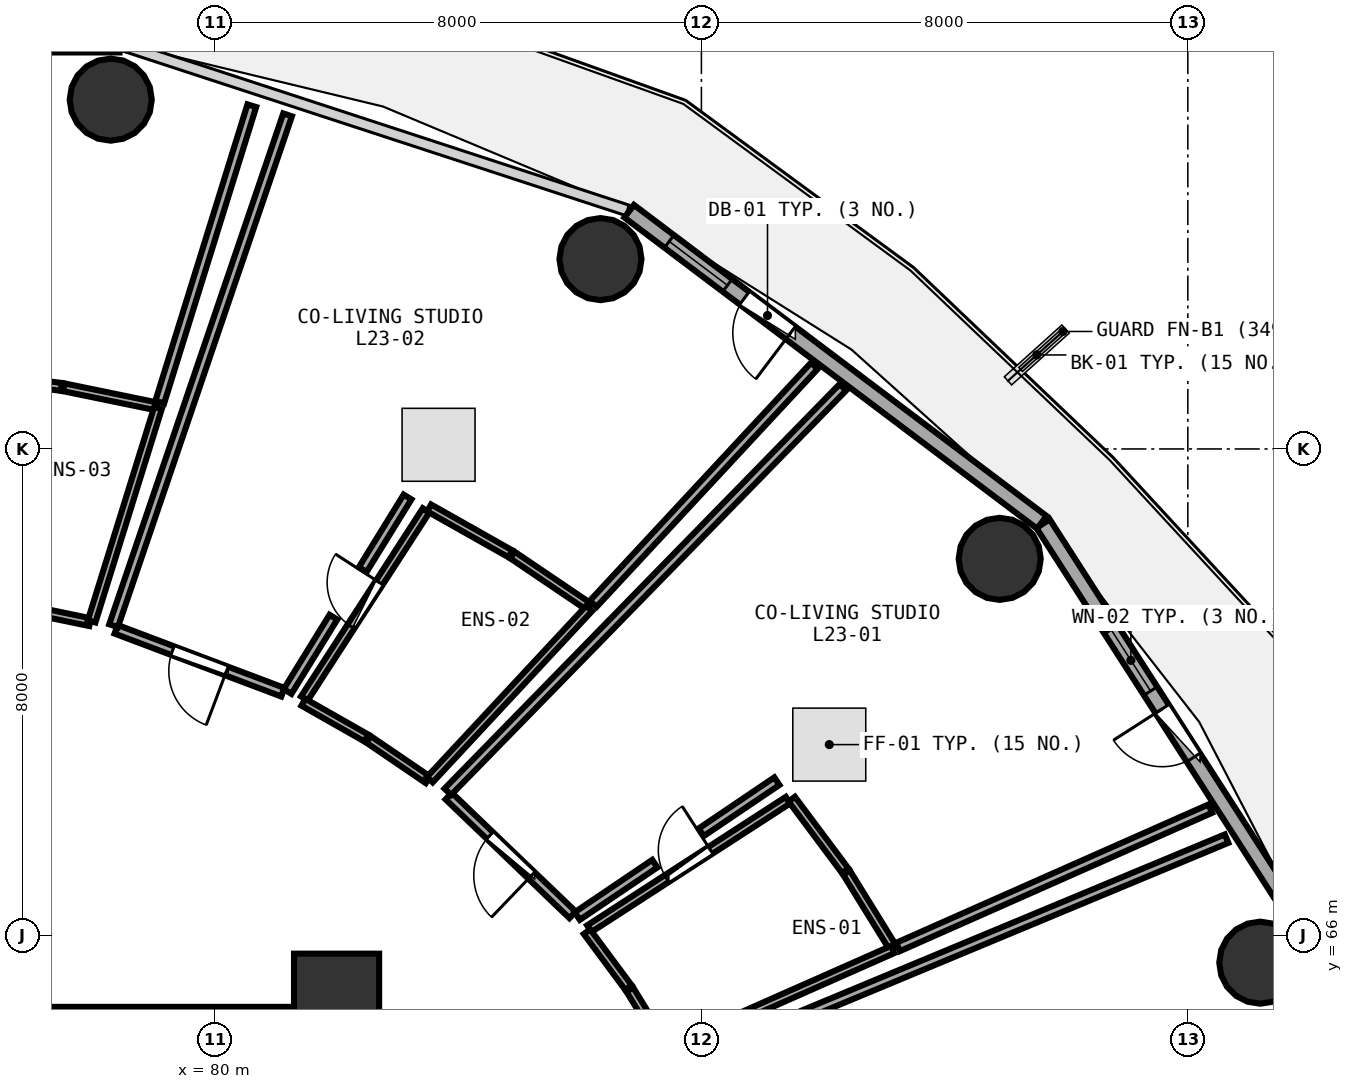
"""IFC4 building model, lengths in metres.
Left out: names, types, materials, properties, quantities, classifications, styles, units other than length and angle.
Written with IfcOpenShell. Run it as: python <this file> out.ifc"""

import sys

from ifc_helpers import new_model, si_unit, direction, frame, frame_2d, origin, origin_2d, place, context, subcontext, project, spatial, rectangle, circle, extrude, element, fill, save


model = new_model("IFC4")
c1 = context("Model", 3, precision=1e-05, world=origin(), true_north=direction((0.0, 1.0)))
c2 = subcontext(c1, "Body", "Model", "MODEL_VIEW")
j1 = project(units=[si_unit("LENGTHUNIT", "METRE"), si_unit("PLANEANGLEUNIT", "RADIAN")], contexts=[c1])
p1 = place(None, origin())
s1 = spatial("IfcSite", under=j1, at=p1, CompositionType="ELEMENT")
p2 = place(p1, origin())
s2 = spatial("IfcBuilding", under=s1, at=p2, CompositionType="ELEMENT")
p3 = place(p2, frame((0.0, 0.0, 91.35)))
s3 = spatial("IfcBuildingStorey", under=s2, at=p3, CompositionType="ELEMENT", Elevation=91.35)
p4 = place(p3, frame((82.0, 65.0, 0.0), z_axis=(0.0, 0.0, 1.0), x_axis=(1.0, 0.0, 0.0)))
e1 = element("IfcColumn", 1, at=p4, inside=s3, PredefinedType="PILASTER", context=c2, shape_type="SweptSolid", body=[
    extrude(rectangle(XDim=1.4, YDim=1.4, at=origin_2d()), origin(), (0.0, 0.0, 1.0), 3.75),
])
for number, where, z_axis, x_axis in (
    (2, (97.192, 65.552, 0.0), (0.0, 0.0, 1.0), (1.0, 0.0, 0.0)),
    (3, (92.906, 72.193, 0.0), (0.0, 0.0, 1.0), (1.0, 0.0, 0.0)),
    (4, (86.34, 77.122, 0.0), (0.0, 0.0, 1.0), (1.0, 0.0, 0.0)),
    (5, (78.286, 79.745, 0.0), (0.0, 0.0, 1.0), (1.0, 0.0, 0.0)),
):
    element("IfcColumn", number, at=place(p3, frame(where, z_axis=z_axis, x_axis=x_axis)), inside=s3, PredefinedType="COLUMN", context=c2, shape_type="SweptSolid", body=[
        extrude(circle(Radius=0.675, at=origin_2d()), origin(), (0.0, 0.0, 1.0), 3.75),
    ])
p5 = place(p3, frame((98.048, 65.879, 0.0), z_axis=(0.0, 0.0, 1.0), x_axis=(-0.540620528459, 0.841266571432, 0.0)))
e6 = element("IfcWall", 6, at=p5, inside=s3, PredefinedType="SOLIDWALL", context=c2, shape_type="SweptSolid", body=[
    extrude(rectangle(XDim=8.193, YDim=0.26, at=frame_2d((4.096, 0.0))), origin(), (0.0, 0.0, 1.0), 3.475),
])
p6 = place(p5, frame((3.621, 0.0, 0.0)))
e7 = element("IfcOpeningElement", 7, at=p6, cuts=e6, PredefinedType="OPENING", context=c2, shape_type="SweptSolid", body=[
    extrude(rectangle(XDim=0.95, YDim=2.1, at=frame_2d((0.475, 1.05))), frame((0.0, 0.14, 0.0), z_axis=(0.0, -1.0, 0.0), x_axis=(1.0, 0.0, 0.0)), (0.0, 0.0, 1.0), 0.28),
])
p7 = place(p5, frame((4.921, 0.0, 0.85)))
e8 = element("IfcOpeningElement", 8, at=p7, cuts=e6, PredefinedType="OPENING", context=c2, shape_type="SweptSolid", body=[
    extrude(rectangle(XDim=1.2, YDim=1.45, at=frame_2d((0.6, 0.725))), frame((0.0, 0.14, 0.0), z_axis=(0.0, -1.0, 0.0), x_axis=(1.0, 0.0, 0.0)), (0.0, 0.0, 1.0), 0.28),
])
p8 = place(p3, frame((93.599, 72.793, 0.0), z_axis=(0.0, 0.0, 1.0), x_axis=(-0.798501507879, 0.601992808857, 0.0)))
e9 = element("IfcWall", 9, at=p8, inside=s3, PredefinedType="SOLIDWALL", context=c2, shape_type="SweptSolid", body=[
    extrude(rectangle(XDim=8.499, YDim=0.26, at=frame_2d((4.25, 0.0))), origin(), (0.0, 0.0, 1.0), 3.475),
])
p9 = place(p8, frame((5.175, 0.0, 0.0)))
e10 = element("IfcOpeningElement", 10, at=p9, cuts=e9, PredefinedType="OPENING", context=c2, shape_type="SweptSolid", body=[
    extrude(rectangle(XDim=0.95, YDim=2.1, at=frame_2d((0.475, 1.05))), frame((0.0, 0.14, 0.0), z_axis=(0.0, -1.0, 0.0), x_axis=(1.0, 0.0, 0.0)), (0.0, 0.0, 1.0), 0.28),
])
p10 = place(p8, frame((6.475, 0.0, 0.85)))
e11 = element("IfcOpeningElement", 11, at=p10, cuts=e9, PredefinedType="OPENING", context=c2, shape_type="SweptSolid", body=[
    extrude(rectangle(XDim=1.2, YDim=1.45, at=frame_2d((0.6, 0.725))), frame((0.0, 0.14, 0.0), z_axis=(0.0, -1.0, 0.0), x_axis=(1.0, 0.0, 0.0)), (0.0, 0.0, 1.0), 0.28),
])
p11 = place(p3, frame((78.43, 80.651, 0.0), z_axis=(0.0, 0.0, 1.0), x_axis=(-1.0, 0.0, 0.0)))
e12 = element("IfcWall", 12, at=p11, inside=s3, PredefinedType="SOLIDWALL", context=c2, shape_type="SweptSolid", body=[
    extrude(rectangle(XDim=8.861, YDim=0.26, at=frame_2d((4.43, 0.0))), origin(), (0.0, 0.0, 1.0), 3.475),
])
p12 = place(p11, frame((3.63, 0.0, 0.85)))
e13 = element("IfcOpeningElement", 13, at=p12, cuts=e12, PredefinedType="OPENING", context=c2, shape_type="SweptSolid", body=[
    extrude(rectangle(XDim=1.6, YDim=1.45, at=frame_2d((0.8, 0.725))), frame((0.0, 0.14, 0.0), z_axis=(0.0, -1.0, 0.0), x_axis=(1.0, 0.0, 0.0)), (0.0, 0.0, 1.0), 0.28),
])
p13 = place(p3, frame((74.0, 64.6, 0.0), z_axis=(0.0, 0.0, 1.0), x_axis=(1.0, 0.0, 0.0)))
e14 = element("IfcWall", 14, at=p13, inside=s3, PredefinedType="SHEAR", context=c2, shape_type="SweptSolid", body=[
    extrude(rectangle(XDim=8.0, YDim=0.45, at=frame_2d((4.0, 0.0))), origin(), (0.0, 0.0, 1.0), 3.49),
])
p14 = place(p3, frame((86.156, 66.111, 0.0), z_axis=(0.0, 0.0, 1.0), x_axis=(0.839597088747, 0.543209654339, 0.0)))
e15 = element("IfcWall", 15, at=p14, inside=s3, PredefinedType="PLUMBINGWALL", context=c2, shape_type="SweptSolid", body=[
    extrude(rectangle(XDim=3.891, YDim=0.13, at=frame_2d((1.946, 0.0))), origin(), (0.0, 0.0, 1.0), 3.175),
])
p15 = place(p14, frame((1.516, 0.0, 0.0)))
e16 = element("IfcOpeningElement", 16, at=p15, cuts=e15, PredefinedType="OPENING", context=c2, shape_type="SweptSolid", body=[
    extrude(rectangle(XDim=0.86, YDim=2.05, at=frame_2d((0.43, 1.025))), frame((0.0, 0.075, 0.0), z_axis=(0.0, -1.0, 0.0), x_axis=(1.0, 0.0, 0.0)), (0.0, 0.0, 1.0), 0.15),
])
p16 = place(p3, frame((85.882, 66.337, 0.0), z_axis=(0.0, 0.0, 1.0), x_axis=(-0.721698326825, 0.692207718144, 0.0)))
e17 = element("IfcWall", 17, at=p16, inside=s3, PredefinedType="PARTITIONING", context=c2, shape_type="SweptSolid", body=[
    extrude(rectangle(XDim=2.823, YDim=0.15, at=frame_2d((1.412, 0.0))), origin(), (0.0, 0.0, 1.0), 2.925),
])
p17 = place(p16, frame((0.936, 0.0, 0.0)))
e18 = element("IfcOpeningElement", 18, at=p17, cuts=e17, PredefinedType="OPENING", context=c2, shape_type="SweptSolid", body=[
    extrude(rectangle(XDim=0.95, YDim=2.08, at=frame_2d((0.475, 1.04))), frame((0.0, 0.085, 0.0), z_axis=(0.0, -1.0, 0.0), x_axis=(1.0, 0.0, 0.0)), (0.0, 0.0, 1.0), 0.17),
])
p18 = place(p3, frame((81.469, 69.896, 0.0), z_axis=(0.0, 0.0, 1.0), x_axis=(0.543429789712, 0.839454622748, 0.0)))
e19 = element("IfcWall", 19, at=p18, inside=s3, PredefinedType="PLUMBINGWALL", context=c2, shape_type="SweptSolid", body=[
    extrude(rectangle(XDim=3.686, YDim=0.13, at=frame_2d((1.843, 0.0))), origin(), (0.0, 0.0, 1.0), 3.175),
])
p19 = place(p18, frame((1.413, 0.0, 0.0)))
e20 = element("IfcOpeningElement", 20, at=p19, cuts=e19, PredefinedType="OPENING", context=c2, shape_type="SweptSolid", body=[
    extrude(rectangle(XDim=0.86, YDim=2.05, at=frame_2d((0.43, 1.025))), frame((0.0, 0.075, 0.0), z_axis=(0.0, -1.0, 0.0), x_axis=(1.0, 0.0, 0.0)), (0.0, 0.0, 1.0), 0.15),
])
p20 = place(p3, frame((81.117, 69.999, 0.0), z_axis=(0.0, 0.0, 1.0), x_axis=(-0.935632349103, 0.352976071868, 0.0)))
e21 = element("IfcWall", 21, at=p20, inside=s3, PredefinedType="PARTITIONING", context=c2, shape_type="SweptSolid", body=[
    extrude(rectangle(XDim=2.931, YDim=0.15, at=frame_2d((1.465, 0.0))), origin(), (0.0, 0.0, 1.0), 2.925),
])
p21 = place(p20, frame((0.99, 0.0, 0.0)))
e22 = element("IfcOpeningElement", 22, at=p21, cuts=e21, PredefinedType="OPENING", context=c2, shape_type="SweptSolid", body=[
    extrude(rectangle(XDim=0.95, YDim=2.08, at=frame_2d((0.475, 1.04))), frame((0.0, 0.085, 0.0), z_axis=(0.0, -1.0, 0.0), x_axis=(1.0, 0.0, 0.0)), (0.0, 0.0, 1.0), 0.17),
])
p22 = place(p3, frame((87.417, 64.141, 0.0), z_axis=(0.0, 0.0, 1.0), x_axis=(-0.52310141153, 0.852270446077, 0.0)))
e23 = element("IfcWall", 23, at=p22, inside=s3, PredefinedType="PLUMBINGWALL", context=c2, shape_type="SweptSolid", body=[
    extrude(rectangle(XDim=1.135, YDim=0.13, at=frame_2d((0.568, 0.0))), origin(), (0.0, 0.0, 1.0), 2.925),
])
p23 = place(p3, frame((86.8, 65.142, 0.0), z_axis=(0.0, 0.0, 1.0), x_axis=(-0.595625136946, 0.803262532574, 0.0)))
e24 = element("IfcWall", 24, at=p23, inside=s3, PredefinedType="PLUMBINGWALL", context=c2, shape_type="SweptSolid", body=[
    extrude(rectangle(XDim=1.145, YDim=0.13, at=frame_2d((0.573, 0.0))), origin(), (0.0, 0.0, 1.0), 2.925),
])
p24 = place(p3, frame((89.486, 68.241, 0.0), z_axis=(0.0, 0.0, 1.0), x_axis=(0.598215175904, -0.801335512328, 0.0)))
e25 = element("IfcWall", 25, at=p24, inside=s3, PredefinedType="PLUMBINGWALL", context=c2, shape_type="SweptSolid", body=[
    extrude(rectangle(XDim=1.468, YDim=0.13, at=frame_2d((0.734, 0.0))), origin(), (0.0, 0.0, 1.0), 3.48),
])
p25 = place(p3, frame((90.386, 67.032, 0.0), z_axis=(0.0, 0.0, 1.0), x_axis=(0.525910281035, -0.850540049793, 0.0)))
e26 = element("IfcWall", 26, at=p25, inside=s3, PredefinedType="PLUMBINGWALL", context=c2, shape_type="SweptSolid", body=[
    extrude(rectangle(XDim=1.457, YDim=0.13, at=frame_2d((0.729, 0.0))), origin(), (0.0, 0.0, 1.0), 3.48),
])
p26 = place(p3, frame((91.145, 65.768, 0.0), z_axis=(0.0, 0.0, 1.0), x_axis=(-0.914586427441, -0.404390487946, 0.0)))
e27 = element("IfcWall", 27, at=p26, inside=s3, PredefinedType="PLUMBINGWALL", context=c2, shape_type="SweptSolid", body=[
    extrude(rectangle(XDim=4.045, YDim=0.13, at=frame_2d((2.022, 0.0))), origin(), (0.0, 0.0, 1.0), 2.925),
])
p27 = place(p3, frame((83.829, 68.362, 0.0), z_axis=(0.0, 0.0, 1.0), x_axis=(0.698749209364, 0.715366718833, 0.0)))
e28 = element("IfcWall", 28, at=p27, inside=s3, PredefinedType="PARTITIONING", context=c2, shape_type="SweptSolid", body=[
    extrude(rectangle(XDim=9.3, YDim=0.15, at=frame_2d((4.65, 0.0))), origin(), (0.0, 0.0, 1.0), 2.975),
])
p28 = place(p3, frame((96.369, 68.085, 0.0), z_axis=(0.0, 0.0, 1.0), x_axis=(-0.914319955381, -0.404992616219, 0.0)))
e29 = element("IfcWall", 29, at=p28, inside=s3, PredefinedType="PARTITIONING", context=c2, shape_type="SweptSolid", body=[
    extrude(rectangle(XDim=5.616, YDim=0.15, at=frame_2d((2.808, 0.0))), origin(), (0.0, 0.0, 1.0), 2.975),
])
p29 = place(p3, frame((89.241, 68.537, 0.0), z_axis=(0.0, 0.0, 1.0), x_axis=(-0.828582854192, -0.559866460631, 0.0)))
e30 = element("IfcWall", 30, at=p29, inside=s3, PredefinedType="PARTITIONING", context=c2, shape_type="SweptSolid", body=[
    extrude(rectangle(XDim=1.502, YDim=0.15, at=frame_2d((0.751, 0.0))), origin(), (0.0, 0.0, 1.0), 3.175),
])
p30 = place(p3, frame((87.234, 67.181, 0.0), z_axis=(0.0, 0.0, 1.0), x_axis=(-0.828521381114, -0.559957427879, 0.0)))
e31 = element("IfcWall", 31, at=p30, inside=s3, PredefinedType="PARTITIONING", context=c2, shape_type="SweptSolid", body=[
    extrude(rectangle(XDim=1.54, YDim=0.15, at=frame_2d((0.77, 0.0))), origin(), (0.0, 0.0, 1.0), 3.235),
])
p31 = place(p3, frame((83.503, 68.558, 0.0), z_axis=(0.0, 0.0, 1.0), x_axis=(-0.826715543633, 0.56262012932, 0.0)))
e32 = element("IfcWall", 32, at=p31, inside=s3, PredefinedType="PLUMBINGWALL", context=c2, shape_type="SweptSolid", body=[
    extrude(rectangle(XDim=1.184, YDim=0.13, at=frame_2d((0.592, 0.0))), origin(), (0.0, 0.0, 1.0), 2.925),
])
p32 = place(p3, frame((82.49, 69.246, 0.0), z_axis=(0.0, 0.0, 1.0), x_axis=(-0.869224537935, 0.494417538778, 0.0)))
e33 = element("IfcWall", 33, at=p32, inside=s3, PredefinedType="PLUMBINGWALL", context=c2, shape_type="SweptSolid", body=[
    extrude(rectangle(XDim=1.192, YDim=0.13, at=frame_2d((0.596, 0.0))), origin(), (0.0, 0.0, 1.0), 3.48),
])
p33 = place(p3, frame((83.522, 73.03, 0.0), z_axis=(0.0, 0.0, 1.0), x_axis=(0.870915556508, -0.491432694713, 0.0)))
e34 = element("IfcWall", 34, at=p33, inside=s3, PredefinedType="PLUMBINGWALL", context=c2, shape_type="SweptSolid", body=[
    extrude(rectangle(XDim=1.533, YDim=0.13, at=frame_2d((0.767, 0.0))), origin(), (0.0, 0.0, 1.0), 2.925),
])
p34 = place(p3, frame((84.892, 72.256, 0.0), z_axis=(0.0, 0.0, 1.0), x_axis=(0.828476223524, -0.560024237917, 0.0)))
e35 = element("IfcWall", 35, at=p34, inside=s3, PredefinedType="PLUMBINGWALL", context=c2, shape_type="SweptSolid", body=[
    extrude(rectangle(XDim=1.521, YDim=0.13, at=frame_2d((0.76, 0.0))), origin(), (0.0, 0.0, 1.0), 3.175),
])
p35 = place(p3, frame((86.154, 71.378, 0.0), z_axis=(0.0, 0.0, 1.0), x_axis=(-0.681137169266, -0.732155828116, 0.0)))
e36 = element("IfcWall", 36, at=p35, inside=s3, PredefinedType="PLUMBINGWALL", context=c2, shape_type="SweptSolid", body=[
    extrude(rectangle(XDim=3.847, YDim=0.13, at=frame_2d((1.924, 0.0))), origin(), (0.0, 0.0, 1.0), 3.175),
])
p36 = place(p3, frame((78.332, 71.093, 0.0), z_axis=(0.0, 0.0, 1.0), x_axis=(0.322500856516, 0.946569172088, 0.0)))
e37 = element("IfcWall", 37, at=p36, inside=s3, PredefinedType="PARTITIONING", context=c2, shape_type="SweptSolid", body=[
    extrude(rectangle(XDim=8.875, YDim=0.15, at=frame_2d((4.438, 0.0))), origin(), (0.0, 0.0, 1.0), 2.925),
])
p37 = place(p3, frame((89.858, 75.367, 0.0), z_axis=(0.0, 0.0, 1.0), x_axis=(-0.680841843483, -0.732430463704, 0.0)))
e38 = element("IfcWall", 38, at=p37, inside=s3, PredefinedType="PARTITIONING", context=c2, shape_type="SweptSolid", body=[
    extrude(rectangle(XDim=5.343, YDim=0.15, at=frame_2d((2.671, 0.0))), origin(), (0.0, 0.0, 1.0), 2.975),
])
p38 = place(p3, frame((83.167, 73.21, 0.0), z_axis=(0.0, 0.0, 1.0), x_axis=(-0.525107327047, -0.8510360128, 0.0)))
e39 = element("IfcWall", 39, at=p38, inside=s3, PredefinedType="PARTITIONING", context=c2, shape_type="SweptSolid", body=[
    extrude(rectangle(XDim=1.402, YDim=0.15, at=frame_2d((0.701, 0.0))), origin(), (0.0, 0.0, 1.0), 3.175),
])
p39 = place(p3, frame((81.948, 71.233, 0.0), z_axis=(0.0, 0.0, 1.0), x_axis=(-0.52498935376, -0.851108793539, 0.0)))
e40 = element("IfcWall", 40, at=p39, inside=s3, PredefinedType="PARTITIONING", context=c2, shape_type="SweptSolid", body=[
    extrude(rectangle(XDim=1.435, YDim=0.15, at=frame_2d((0.718, 0.0))), origin(), (0.0, 0.0, 1.0), 3.235),
])
p40 = place(p3, frame((77.946, 71.151, 0.0), z_axis=(0.0, 0.0, 1.0), x_axis=(-0.979121805859, 0.203274418684, 0.0)))
e41 = element("IfcWall", 41, at=p40, inside=s3, PredefinedType="PLUMBINGWALL", context=c2, shape_type="SweptSolid", body=[
    extrude(rectangle(XDim=1.219, YDim=0.13, at=frame_2d((0.609, 0.0))), origin(), (0.0, 0.0, 1.0), 3.48),
])
p41 = place(p3, frame((75.913, 75.22, 0.0), z_axis=(0.0, 0.0, 1.0), x_axis=(0.991898711333, -0.127031281405, 0.0)))
e42 = element("IfcWall", 42, at=p41, inside=s3, PredefinedType="PLUMBINGWALL", context=c2, shape_type="SweptSolid", body=[
    extrude(rectangle(XDim=1.574, YDim=0.13, at=frame_2d((0.787, 0.0))), origin(), (0.0, 0.0, 1.0), 3.48),
])
p42 = place(p3, frame((77.514, 75.014, 0.0), z_axis=(0.0, 0.0, 1.0), x_axis=(0.979487788462, -0.201503529137, 0.0)))
e43 = element("IfcWall", 43, at=p42, inside=s3, PredefinedType="PLUMBINGWALL", context=c2, shape_type="SweptSolid", body=[
    extrude(rectangle(XDim=1.568, YDim=0.13, at=frame_2d((0.784, 0.0))), origin(), (0.0, 0.0, 1.0), 3.48),
])
p43 = place(p3, frame((79.063, 74.675, 0.0), z_axis=(0.0, 0.0, 1.0), x_axis=(-0.296927892497, -0.954899903999, 0.0)))
e44 = element("IfcWall", 44, at=p43, inside=s3, PredefinedType="PLUMBINGWALL", context=c2, shape_type="SweptSolid", body=[
    extrude(rectangle(XDim=3.675, YDim=0.13, at=frame_2d((1.837, 0.0))), origin(), (0.0, 0.0, 1.0), 3.175),
])
p44 = place(p3, frame((80.606, 79.645, 0.0), z_axis=(0.0, 0.0, 1.0), x_axis=(-0.2966895532, -0.954973983427, 0.0)))
e45 = element("IfcWall", 45, at=p44, inside=s3, PredefinedType="PARTITIONING", context=c2, shape_type="SweptSolid", body=[
    extrude(rectangle(XDim=5.104, YDim=0.15, at=frame_2d((2.552, 0.0))), origin(), (0.0, 0.0, 1.0), 2.925),
])
p45 = place(p3, frame((87.625, 63.84, 0.0), z_axis=(0.0, 0.0, 1.0), x_axis=(0.92321744991, 0.384277946521, 0.0)))
e46 = element("IfcWall", 46, at=p45, inside=s3, PredefinedType="PARTITIONING", context=c2, shape_type="SweptSolid", body=[
    extrude(rectangle(XDim=9.762, YDim=0.15, at=frame_2d((4.881, 0.0))), origin(), (0.0, 0.0, 1.0), 2.925),
])
p46 = place(p6, frame((0.95, 0.0, 0.0), z_axis=(0.0, 0.0, 1.0), x_axis=(-1.0, 0.0, 0.0)))
e47 = element("IfcDoor", 47, at=p46, inside=s3, OperationType="SINGLE_SWING_LEFT", PredefinedType="DOOR", context=c2, shape_type="SweptSolid", body=[
    extrude(rectangle(XDim=0.95, YDim=2.1, at=frame_2d((0.475, 1.05))), frame((0.0, 0.025, 0.0), z_axis=(0.0, -1.0, 0.0), x_axis=(1.0, 0.0, 0.0)), (0.0, 0.0, 1.0), 0.05),
])
fill(e7, e47)
p47 = place(p7, origin())
e48 = element("IfcWindow", 48, at=p47, inside=s3, PartitioningType="SINGLE_PANEL", PredefinedType="WINDOW", context=c2, shape_type="SweptSolid", body=[
    extrude(rectangle(XDim=1.2, YDim=1.45, at=frame_2d((0.6, 0.725))), frame((0.0, 0.03, 0.0), z_axis=(0.0, -1.0, 0.0), x_axis=(1.0, 0.0, 0.0)), (0.0, 0.0, 1.0), 0.06),
])
fill(e8, e48)
p48 = place(p9, frame((0.95, 0.0, 0.0), z_axis=(0.0, 0.0, 1.0), x_axis=(-1.0, 0.0, 0.0)))
e49 = element("IfcDoor", 49, at=p48, inside=s3, OperationType="SINGLE_SWING_RIGHT", PredefinedType="DOOR", context=c2, shape_type="SweptSolid", body=[
    extrude(rectangle(XDim=0.95, YDim=2.1, at=frame_2d((0.475, 1.05))), frame((0.0, 0.025, 0.0), z_axis=(0.0, -1.0, 0.0), x_axis=(1.0, 0.0, 0.0)), (0.0, 0.0, 1.0), 0.05),
])
fill(e10, e49)
p49 = place(p10, origin())
e50 = element("IfcWindow", 50, at=p49, inside=s3, PartitioningType="SINGLE_PANEL", PredefinedType="WINDOW", context=c2, shape_type="SweptSolid", body=[
    extrude(rectangle(XDim=1.2, YDim=1.45, at=frame_2d((0.6, 0.725))), frame((0.0, 0.03, 0.0), z_axis=(0.0, -1.0, 0.0), x_axis=(1.0, 0.0, 0.0)), (0.0, 0.0, 1.0), 0.06),
])
fill(e11, e50)
p50 = place(p15, origin())
e51 = element("IfcDoor", 51, at=p50, inside=s3, OperationType="SINGLE_SWING_RIGHT", PredefinedType="DOOR", context=c2, shape_type="SweptSolid", body=[
    extrude(rectangle(XDim=0.86, YDim=2.05, at=frame_2d((0.43, 1.025))), frame((0.0, 0.025, 0.0), z_axis=(0.0, -1.0, 0.0), x_axis=(1.0, 0.0, 0.0)), (0.0, 0.0, 1.0), 0.05),
])
fill(e16, e51)
p51 = place(p17, origin())
e52 = element("IfcDoor", 52, at=p51, inside=s3, OperationType="SINGLE_SWING_LEFT", PredefinedType="DOOR", context=c2, shape_type="SweptSolid", body=[
    extrude(rectangle(XDim=0.95, YDim=2.08, at=frame_2d((0.475, 1.04))), frame((0.0, 0.025, 0.0), z_axis=(0.0, -1.0, 0.0), x_axis=(1.0, 0.0, 0.0)), (0.0, 0.0, 1.0), 0.05),
])
fill(e18, e52)
p52 = place(p19, origin())
e53 = element("IfcDoor", 53, at=p52, inside=s3, OperationType="SINGLE_SWING_RIGHT", PredefinedType="DOOR", context=c2, shape_type="SweptSolid", body=[
    extrude(rectangle(XDim=0.86, YDim=2.05, at=frame_2d((0.43, 1.025))), frame((0.0, 0.025, 0.0), z_axis=(0.0, -1.0, 0.0), x_axis=(1.0, 0.0, 0.0)), (0.0, 0.0, 1.0), 0.05),
])
fill(e20, e53)
p53 = place(p21, origin())
e54 = element("IfcDoor", 54, at=p53, inside=s3, OperationType="SINGLE_SWING_LEFT", PredefinedType="DOOR", context=c2, shape_type="SweptSolid", body=[
    extrude(rectangle(XDim=0.95, YDim=2.08, at=frame_2d((0.475, 1.04))), frame((0.0, 0.025, 0.0), z_axis=(0.0, -1.0, 0.0), x_axis=(1.0, 0.0, 0.0)), (0.0, 0.0, 1.0), 0.05),
])
fill(e22, e54)
save(model, sys.argv[1])
